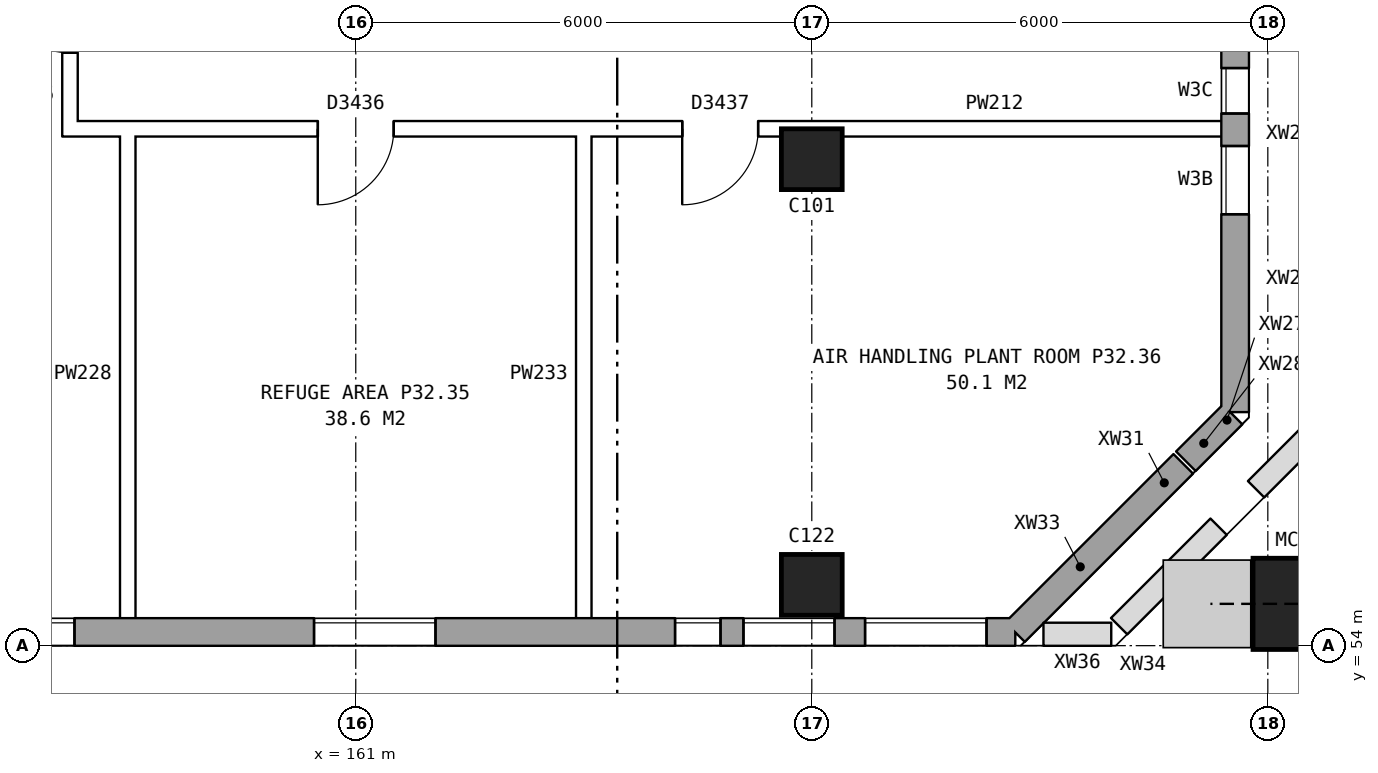
"""IFC4 building model, lengths in metres.
Left out: names, types, materials, properties, quantities, classifications, styles, units other than length and angle.
Written with IfcOpenShell. Run it as: python <this file> out.ifc"""

import sys

from ifc_helpers import new_model, si_unit, direction, frame, frame_2d, origin, origin_2d, place, context, subcontext, project, spatial, rectangle, hollow_rectangle, extrude, element, fill, save


model = new_model("IFC4")
c1 = context("Model", 3, precision=1e-05, world=origin(), true_north=direction((0.0, 1.0)))
c2 = subcontext(c1, "Body", "Model", "MODEL_VIEW")
j1 = project(units=[si_unit("LENGTHUNIT", "METRE"), si_unit("PLANEANGLEUNIT", "RADIAN")], contexts=[c1])
p1 = place(None, origin())
s1 = spatial("IfcSite", under=j1, at=p1, CompositionType="ELEMENT")
p2 = place(p1, origin())
s2 = spatial("IfcBuilding", under=s1, at=p2, CompositionType="ELEMENT")
p3 = place(p2, frame((0.0, 0.0, 115.0)))
s3 = spatial("IfcBuildingStorey", under=s2, at=p3, CompositionType="ELEMENT", Elevation=115.0)
for number, where, z_axis, x_axis in (
    (1, (167.0, 54.8, 0.0), (0.0, 0.0, 1.0), (1.0, 0.0, 0.0)),
    (2, (167.0, 60.4, 0.0), (0.0, 0.0, 1.0), (1.0, 0.0, 0.0)),
):
    element("IfcColumn", number, at=place(p3, frame(where, z_axis=z_axis, x_axis=x_axis)), inside=s3, PredefinedType="COLUMN", context=c2, shape_type="SweptSolid", body=[
        extrude(rectangle(XDim=0.8, YDim=0.8, at=origin_2d()), origin(), (0.0, 0.0, 1.0), 4.2),
    ])
p4 = place(p3, frame((173.406, 54.55, 0.161), z_axis=(-0.267672897269, 0.0, 0.963509844302), x_axis=(0.0, -1.0, 0.0)))
e3 = element("IfcColumn", 3, at=p4, inside=s3, PredefinedType="COLUMN", context=c2, shape_type="SweptSolid", body=[
    extrude(hollow_rectangle(XDim=1.2, YDim=1.2, WallThickness=0.065, at=origin_2d()), origin(), (0.0, 0.0, 1.0), 4.337),
])
p5 = place(p3, frame((134.075, 54.18, 0.0), z_axis=(0.0, 0.0, 1.0), x_axis=(1.0, 0.0, 0.0)))
e4 = element("IfcWall", 4, at=p5, inside=s3, PredefinedType="STANDARD", context=c2, shape_type="SweptSolid", body=[
    extrude(rectangle(XDim=35.601, YDim=0.36, at=frame_2d((17.8, 0.0))), origin(), (0.0, 0.0, 1.0), 4.2),
])
p6 = place(p5, frame((3.125, 0.0, 1.5)))
e5 = element("IfcOpeningElement", 5, at=p6, cuts=e4, PredefinedType="OPENING", context=c2, shape_type="SweptSolid", body=[
    extrude(rectangle(XDim=1.2, YDim=1.2, at=frame_2d((0.6, 0.6))), frame((0.0, 0.19, 0.0), z_axis=(0.0, -1.0, 0.0), x_axis=(1.0, 0.0, 0.0)), (0.0, 0.0, 1.0), 0.38),
])
p7 = place(p5, frame((7.175, 0.0, 1.5)))
e6 = element("IfcOpeningElement", 6, at=p7, cuts=e4, PredefinedType="OPENING", context=c2, shape_type="SweptSolid", body=[
    extrude(rectangle(XDim=1.2, YDim=1.2, at=frame_2d((0.6, 0.6))), frame((0.0, 0.19, 0.0), z_axis=(0.0, -1.0, 0.0), x_axis=(1.0, 0.0, 0.0)), (0.0, 0.0, 1.0), 0.38),
])
p8 = place(p5, frame((9.625, 0.0, 1.5)))
e7 = element("IfcOpeningElement", 7, at=p8, cuts=e4, PredefinedType="OPENING", context=c2, shape_type="SweptSolid", body=[
    extrude(rectangle(XDim=1.6, YDim=1.2, at=frame_2d((0.8, 0.6))), frame((0.0, 0.19, 0.0), z_axis=(0.0, -1.0, 0.0), x_axis=(1.0, 0.0, 0.0)), (0.0, 0.0, 1.0), 0.38),
])
p9 = place(p5, frame((15.125, 0.0, 1.5)))
e8 = element("IfcOpeningElement", 8, at=p9, cuts=e4, PredefinedType="OPENING", context=c2, shape_type="SweptSolid", body=[
    extrude(rectangle(XDim=1.2, YDim=1.2, at=frame_2d((0.6, 0.6))), frame((0.0, 0.19, 0.0), z_axis=(0.0, -1.0, 0.0), x_axis=(1.0, 0.0, 0.0)), (0.0, 0.0, 1.0), 0.38),
])
p10 = place(p5, frame((19.125, 0.0, 1.5)))
e9 = element("IfcOpeningElement", 9, at=p10, cuts=e4, PredefinedType="OPENING", context=c2, shape_type="SweptSolid", body=[
    extrude(rectangle(XDim=0.6, YDim=1.2, at=frame_2d((0.3, 0.6))), frame((0.0, 0.19, 0.0), z_axis=(0.0, -1.0, 0.0), x_axis=(1.0, 0.0, 0.0)), (0.0, 0.0, 1.0), 0.38),
])
p11 = place(p5, frame((21.625, 0.0, 1.5)))
e10 = element("IfcOpeningElement", 10, at=p11, cuts=e4, PredefinedType="OPENING", context=c2, shape_type="SweptSolid", body=[
    extrude(rectangle(XDim=1.6, YDim=1.2, at=frame_2d((0.8, 0.6))), frame((0.0, 0.19, 0.0), z_axis=(0.0, -1.0, 0.0), x_axis=(1.0, 0.0, 0.0)), (0.0, 0.0, 1.0), 0.38),
])
p12 = place(p5, frame((26.375, 0.0, 1.5)))
e11 = element("IfcOpeningElement", 11, at=p12, cuts=e4, PredefinedType="OPENING", context=c2, shape_type="SweptSolid", body=[
    extrude(rectangle(XDim=1.6, YDim=1.2, at=frame_2d((0.8, 0.6))), frame((0.0, 0.19, 0.0), z_axis=(0.0, -1.0, 0.0), x_axis=(1.0, 0.0, 0.0)), (0.0, 0.0, 1.0), 0.38),
])
p13 = place(p5, frame((31.125, 0.0, 1.5)))
e12 = element("IfcOpeningElement", 12, at=p13, cuts=e4, PredefinedType="OPENING", context=c2, shape_type="SweptSolid", body=[
    extrude(rectangle(XDim=0.6, YDim=1.2, at=frame_2d((0.3, 0.6))), frame((0.0, 0.19, 0.0), z_axis=(0.0, -1.0, 0.0), x_axis=(1.0, 0.0, 0.0)), (0.0, 0.0, 1.0), 0.38),
])
p14 = place(p5, frame((33.625, 0.0, 1.5)))
e13 = element("IfcOpeningElement", 13, at=p14, cuts=e4, PredefinedType="OPENING", context=c2, shape_type="SweptSolid", body=[
    extrude(rectangle(XDim=1.6, YDim=1.2, at=frame_2d((0.8, 0.6))), frame((0.0, 0.19, 0.0), z_axis=(0.0, -1.0, 0.0), x_axis=(1.0, 0.0, 0.0)), (0.0, 0.0, 1.0), 0.38),
])
p15 = place(p5, frame((20.025, 0.0, 1.5)))
e14 = element("IfcOpeningElement", 14, at=p15, cuts=e4, PredefinedType="OPENING", context=c2, shape_type="SweptSolid", body=[
    extrude(rectangle(XDim=1.2, YDim=1.2, at=frame_2d((0.6, 0.6))), frame((0.0, 0.19, 0.0), z_axis=(0.0, -1.0, 0.0), x_axis=(1.0, 0.0, 0.0)), (0.0, 0.0, 1.0), 0.38),
])
p16 = place(p5, frame((32.025, 0.0, 1.5)))
e15 = element("IfcOpeningElement", 15, at=p16, cuts=e4, PredefinedType="OPENING", context=c2, shape_type="SweptSolid", body=[
    extrude(rectangle(XDim=1.2, YDim=1.2, at=frame_2d((0.6, 0.6))), frame((0.0, 0.19, 0.0), z_axis=(0.0, -1.0, 0.0), x_axis=(1.0, 0.0, 0.0)), (0.0, 0.0, 1.0), 0.38),
])
p17 = place(p3, frame((169.675, 54.18, 0.0), z_axis=(0.0, 0.0, 1.0), x_axis=(0.707106781187, 0.707106781187, 0.0)))
e16 = element("IfcWall", 16, at=p17, inside=s3, PredefinedType="STANDARD", context=c2, shape_type="SweptSolid", body=[
    extrude(rectangle(XDim=2.424, YDim=0.36, at=frame_2d((1.212, 0.0))), origin(), (0.0, 0.0, 1.0), 4.2),
])
p18 = place(p3, frame((171.389, 55.894, 0.0), z_axis=(0.0, 0.0, 1.0), x_axis=(0.707106781187, 0.707106781187, 0.0)))
e17 = element("IfcWall", 17, at=p18, inside=s3, PredefinedType="STANDARD", context=c2, shape_type="SweptSolid", body=[
    extrude(rectangle(XDim=0.703, YDim=0.36, at=frame_2d((0.351, 0.0))), origin(), (0.0, 0.0, 1.0), 3.397),
])
p19 = place(p3, frame((171.923, 56.428, 0.953), z_axis=(0.0, 0.0, 1.0), x_axis=(0.707291043531, 0.706922470814, 0.0)))
e18 = element("IfcWall", 18, at=p19, inside=s3, PredefinedType="STANDARD", context=c2, shape_type="SweptSolid", body=[
    extrude(rectangle(XDim=0.662, YDim=0.36, at=frame_2d((0.331, 0.0))), origin(), (0.0, 0.0, 1.0), 3.247),
])
p20 = place(p3, frame((172.392, 56.896, 0.0), z_axis=(0.0, 0.0, 1.0), x_axis=(0.706503705369, 0.707709343092, 0.0)))
e19 = element("IfcWall", 19, at=p20, inside=s3, PredefinedType="STANDARD", context=c2, shape_type="SweptSolid", body=[
    extrude(rectangle(XDim=0.202, YDim=0.36, at=frame_2d((0.101, 0.0))), origin(), (0.0, 0.0, 1.0), 4.2),
])
p21 = place(p3, frame((172.57, 57.075, 0.0), z_axis=(0.0, 0.0, 1.0), x_axis=(0.0, 1.0, 0.0)))
e20 = element("IfcWall", 20, at=p21, inside=s3, PredefinedType="STANDARD", context=c2, shape_type="SweptSolid", body=[
    extrude(rectangle(XDim=25.851, YDim=0.36, at=frame_2d((12.925, 0.0))), origin(), (0.0, 0.0, 1.0), 4.2),
])
p22 = place(p21, frame((2.6, 0.0, 1.5)))
e21 = element("IfcOpeningElement", 21, at=p22, cuts=e20, PredefinedType="OPENING", context=c2, shape_type="SweptSolid", body=[
    extrude(rectangle(XDim=0.9, YDim=1.2, at=frame_2d((0.45, 0.6))), frame((0.0, 0.19, 0.0), z_axis=(0.0, -1.0, 0.0), x_axis=(1.0, 0.0, 0.0)), (0.0, 0.0, 1.0), 0.38),
])
p23 = place(p21, frame((3.925, 0.0, 1.5)))
e22 = element("IfcOpeningElement", 22, at=p23, cuts=e20, PredefinedType="OPENING", context=c2, shape_type="SweptSolid", body=[
    extrude(rectangle(XDim=0.6, YDim=1.2, at=frame_2d((0.3, 0.6))), frame((0.0, 0.19, 0.0), z_axis=(0.0, -1.0, 0.0), x_axis=(1.0, 0.0, 0.0)), (0.0, 0.0, 1.0), 0.38),
])
p24 = place(p21, frame((7.625, 0.0, 1.5)))
e23 = element("IfcOpeningElement", 23, at=p24, cuts=e20, PredefinedType="OPENING", context=c2, shape_type="SweptSolid", body=[
    extrude(rectangle(XDim=1.6, YDim=1.2, at=frame_2d((0.8, 0.6))), frame((0.0, 0.19, 0.0), z_axis=(0.0, -1.0, 0.0), x_axis=(1.0, 0.0, 0.0)), (0.0, 0.0, 1.0), 0.38),
])
p25 = place(p21, frame((10.625, 0.0, 1.5)))
e24 = element("IfcOpeningElement", 24, at=p25, cuts=e20, PredefinedType="OPENING", context=c2, shape_type="SweptSolid", body=[
    extrude(rectangle(XDim=1.6, YDim=1.2, at=frame_2d((0.8, 0.6))), frame((0.0, 0.19, 0.0), z_axis=(0.0, -1.0, 0.0), x_axis=(1.0, 0.0, 0.0)), (0.0, 0.0, 1.0), 0.38),
])
p26 = place(p21, frame((9.525, 0.0, 1.5)))
e25 = element("IfcOpeningElement", 25, at=p26, cuts=e20, PredefinedType="OPENING", context=c2, shape_type="SweptSolid", body=[
    extrude(rectangle(XDim=0.6, YDim=1.2, at=frame_2d((0.3, 0.6))), frame((0.0, 0.19, 0.0), z_axis=(0.0, -1.0, 0.0), x_axis=(1.0, 0.0, 0.0)), (0.0, 0.0, 1.0), 0.38),
])
p27 = place(p21, frame((14.975, 0.0, 1.5)))
e26 = element("IfcOpeningElement", 26, at=p27, cuts=e20, PredefinedType="OPENING", context=c2, shape_type="SweptSolid", body=[
    extrude(rectangle(XDim=0.6, YDim=1.2, at=frame_2d((0.3, 0.6))), frame((0.0, 0.19, 0.0), z_axis=(0.0, -1.0, 0.0), x_axis=(1.0, 0.0, 0.0)), (0.0, 0.0, 1.0), 0.38),
])
p28 = place(p21, frame((19.625, 0.0, 1.5)))
e27 = element("IfcOpeningElement", 27, at=p28, cuts=e20, PredefinedType="OPENING", context=c2, shape_type="SweptSolid", body=[
    extrude(rectangle(XDim=1.6, YDim=1.2, at=frame_2d((0.8, 0.6))), frame((0.0, 0.19, 0.0), z_axis=(0.0, -1.0, 0.0), x_axis=(1.0, 0.0, 0.0)), (0.0, 0.0, 1.0), 0.38),
])
p29 = place(p21, frame((22.625, 0.0, 1.5)))
e28 = element("IfcOpeningElement", 28, at=p29, cuts=e20, PredefinedType="OPENING", context=c2, shape_type="SweptSolid", body=[
    extrude(rectangle(XDim=1.6, YDim=1.2, at=frame_2d((0.8, 0.6))), frame((0.0, 0.19, 0.0), z_axis=(0.0, -1.0, 0.0), x_axis=(1.0, 0.0, 0.0)), (0.0, 0.0, 1.0), 0.38),
])
p30 = place(p21, frame((15.875, 0.0, 1.5)))
e29 = element("IfcOpeningElement", 29, at=p30, cuts=e20, PredefinedType="OPENING", context=c2, shape_type="SweptSolid", body=[
    extrude(rectangle(XDim=1.2, YDim=1.2, at=frame_2d((0.6, 0.6))), frame((0.0, 0.19, 0.0), z_axis=(0.0, -1.0, 0.0), x_axis=(1.0, 0.0, 0.0)), (0.0, 0.0, 1.0), 0.38),
])
p31 = place(p3, frame((170.05, 54.15, 0.0), z_axis=(0.0, 0.0, 1.0), x_axis=(1.0, 0.0, 0.0)))
e30 = element("IfcWall", 30, at=p31, inside=s3, PredefinedType="PARAPET", context=c2, shape_type="SweptSolid", body=[
    extrude(rectangle(XDim=0.888, YDim=0.3, at=frame_2d((0.444, 0.0))), origin(), (0.0, 0.0, 1.0), 1.1),
])
p32 = place(p3, frame((171.045, 54.258, 0.0), z_axis=(0.0, 0.0, 1.0), x_axis=(0.707106781187, 0.707106781187, 0.0)))
e31 = element("IfcWall", 31, at=p32, inside=s3, PredefinedType="PARAPET", context=c2, shape_type="SweptSolid", body=[
    extrude(rectangle(XDim=1.847, YDim=0.3, at=frame_2d((0.923, 0.0))), origin(), (0.0, 0.0, 1.0), 1.1),
])
p33 = place(p3, frame((172.847, 56.059, 0.0), z_axis=(0.0, 0.0, 1.0), x_axis=(0.706911150604, 0.70730235766, 0.0)))
e32 = element("IfcWall", 32, at=p33, inside=s3, PredefinedType="PARAPET", context=c2, shape_type="SweptSolid", body=[
    extrude(rectangle(XDim=1.248, YDim=0.3, at=frame_2d((0.624, 0.0))), origin(), (0.0, 0.0, 1.0), 1.1),
])
p34 = place(p3, frame((157.14, 60.8, 0.0), z_axis=(0.0, 0.0, 1.0), x_axis=(1.0, 0.0, 0.0)))
e33 = element("IfcWall", 33, at=p34, inside=s3, PredefinedType="PARTITIONING", context=c2, shape_type="SweptSolid", body=[
    extrude(rectangle(XDim=15.37, YDim=0.2, at=frame_2d((7.685, 0.0))), origin(), (0.0, 0.0, 1.0), 4.2),
])
p35 = place(p34, frame((3.36, 0.0, 0.0)))
e34 = element("IfcOpeningElement", 34, at=p35, cuts=e33, PredefinedType="OPENING", context=c2, shape_type="SweptSolid", body=[
    extrude(rectangle(XDim=1.0, YDim=2.1, at=frame_2d((0.5, 1.05))), frame((0.0, 0.11, 0.0), z_axis=(0.0, -1.0, 0.0), x_axis=(1.0, 0.0, 0.0)), (0.0, 0.0, 1.0), 0.22),
])
p36 = place(p34, frame((8.155, 0.0, 0.0)))
e35 = element("IfcOpeningElement", 35, at=p36, cuts=e33, PredefinedType="OPENING", context=c2, shape_type="SweptSolid", body=[
    extrude(rectangle(XDim=1.0, YDim=2.1, at=frame_2d((0.5, 1.05))), frame((0.0, 0.11, 0.0), z_axis=(0.0, -1.0, 0.0), x_axis=(1.0, 0.0, 0.0)), (0.0, 0.0, 1.0), 0.22),
])
p37 = place(p3, frame((157.24, 60.7, 0.0), z_axis=(0.0, 0.0, 1.0), x_axis=(0.0, 1.0, 0.0)))
e36 = element("IfcWall", 36, at=p37, inside=s3, PredefinedType="PARTITIONING", context=c2, shape_type="SweptSolid", body=[
    extrude(rectangle(XDim=3.2, YDim=0.2, at=frame_2d((1.6, 0.0))), origin(), (0.0, 0.0, 1.0), 4.2),
])
p38 = place(p37, frame((1.1, 0.0, 0.0)))
e37 = element("IfcOpeningElement", 37, at=p38, cuts=e36, PredefinedType="OPENING", context=c2, shape_type="SweptSolid", body=[
    extrude(rectangle(XDim=1.0, YDim=2.1, at=frame_2d((0.5, 1.05))), frame((0.0, 0.11, 0.0), z_axis=(0.0, -1.0, 0.0), x_axis=(1.0, 0.0, 0.0)), (0.0, 0.0, 1.0), 0.22),
])
for number, where, z_axis, x_axis in (
    (38, (158.0, 54.24, 0.0), (0.0, 0.0, 1.0), (0.0, 1.0, 0.0)),
    (39, (164.0, 54.24, 0.0), (0.0, 0.0, 1.0), (0.0, 1.0, 0.0)),
):
    element("IfcWall", number, at=place(p3, frame(where, z_axis=z_axis, x_axis=x_axis)), inside=s3, PredefinedType="PARTITIONING", context=c2, shape_type="SweptSolid", body=[
        extrude(rectangle(XDim=6.66, YDim=0.2, at=frame_2d((3.33, 0.0))), origin(), (0.0, 0.0, 1.0), 4.2),
    ])
p39 = place(p11, origin())
e40 = element("IfcWindow", 40, at=p39, inside=s3, PartitioningType="DOUBLE_PANEL_HORIZONTAL", PredefinedType="WINDOW", context=c2, shape_type="SweptSolid", body=[
    extrude(rectangle(XDim=1.6, YDim=1.2, at=frame_2d((0.8, 0.6))), frame((0.0, 0.15, 0.0), z_axis=(0.0, -1.0, 0.0), x_axis=(1.0, 0.0, 0.0)), (0.0, 0.0, 1.0), 0.06),
])
fill(e10, e40)
p40 = place(p12, origin())
e41 = element("IfcWindow", 41, at=p40, inside=s3, PartitioningType="DOUBLE_PANEL_HORIZONTAL", PredefinedType="WINDOW", context=c2, shape_type="SweptSolid", body=[
    extrude(rectangle(XDim=1.6, YDim=1.2, at=frame_2d((0.8, 0.6))), frame((0.0, 0.15, 0.0), z_axis=(0.0, -1.0, 0.0), x_axis=(1.0, 0.0, 0.0)), (0.0, 0.0, 1.0), 0.06),
])
fill(e11, e41)
p41 = place(p13, origin())
e42 = element("IfcWindow", 42, at=p41, inside=s3, PartitioningType="DOUBLE_PANEL_HORIZONTAL", PredefinedType="WINDOW", context=c2, shape_type="SweptSolid", body=[
    extrude(rectangle(XDim=0.6, YDim=1.2, at=frame_2d((0.3, 0.6))), frame((0.0, 0.15, 0.0), z_axis=(0.0, -1.0, 0.0), x_axis=(1.0, 0.0, 0.0)), (0.0, 0.0, 1.0), 0.06),
])
fill(e12, e42)
p42 = place(p14, origin())
e43 = element("IfcWindow", 43, at=p42, inside=s3, PartitioningType="DOUBLE_PANEL_HORIZONTAL", PredefinedType="WINDOW", context=c2, shape_type="SweptSolid", body=[
    extrude(rectangle(XDim=1.6, YDim=1.2, at=frame_2d((0.8, 0.6))), frame((0.0, 0.15, 0.0), z_axis=(0.0, -1.0, 0.0), x_axis=(1.0, 0.0, 0.0)), (0.0, 0.0, 1.0), 0.06),
])
fill(e13, e43)
p43 = place(p22, origin())
e44 = element("IfcWindow", 44, at=p43, inside=s3, PartitioningType="DOUBLE_PANEL_HORIZONTAL", PredefinedType="WINDOW", context=c2, shape_type="SweptSolid", body=[
    extrude(rectangle(XDim=0.9, YDim=1.2, at=frame_2d((0.45, 0.6))), frame((0.0, 0.15, 0.0), z_axis=(0.0, -1.0, 0.0), x_axis=(1.0, 0.0, 0.0)), (0.0, 0.0, 1.0), 0.06),
])
fill(e21, e44)
p44 = place(p23, origin())
e45 = element("IfcWindow", 45, at=p44, inside=s3, PartitioningType="DOUBLE_PANEL_HORIZONTAL", PredefinedType="WINDOW", context=c2, shape_type="SweptSolid", body=[
    extrude(rectangle(XDim=0.6, YDim=1.2, at=frame_2d((0.3, 0.6))), frame((0.0, 0.15, 0.0), z_axis=(0.0, -1.0, 0.0), x_axis=(1.0, 0.0, 0.0)), (0.0, 0.0, 1.0), 0.06),
])
fill(e22, e45)
p45 = place(p35, frame((1.0, 0.0, 0.0), z_axis=(0.0, 0.0, 1.0), x_axis=(-1.0, 0.0, 0.0)))
e46 = element("IfcDoor", 46, at=p45, inside=s3, OperationType="SINGLE_SWING_RIGHT", PredefinedType="DOOR", context=c2, shape_type="SweptSolid", body=[
    extrude(rectangle(XDim=1.0, YDim=2.1, at=frame_2d((0.5, 1.05))), frame((0.0, 0.025, 0.0), z_axis=(0.0, -1.0, 0.0), x_axis=(1.0, 0.0, 0.0)), (0.0, 0.0, 1.0), 0.05),
])
fill(e34, e46)
p46 = place(p36, frame((1.0, 0.0, 0.0), z_axis=(0.0, 0.0, 1.0), x_axis=(-1.0, 0.0, 0.0)))
e47 = element("IfcDoor", 47, at=p46, inside=s3, OperationType="SINGLE_SWING_RIGHT", PredefinedType="DOOR", context=c2, shape_type="SweptSolid", body=[
    extrude(rectangle(XDim=1.0, YDim=2.1, at=frame_2d((0.5, 1.05))), frame((0.0, 0.025, 0.0), z_axis=(0.0, -1.0, 0.0), x_axis=(1.0, 0.0, 0.0)), (0.0, 0.0, 1.0), 0.05),
])
fill(e35, e47)
p47 = place(p16, origin())
e48 = element("IfcWindow", 48, at=p47, inside=s3, PartitioningType="DOUBLE_PANEL_HORIZONTAL", PredefinedType="WINDOW", context=c2, shape_type="SweptSolid", body=[
    extrude(rectangle(XDim=1.2, YDim=1.2, at=frame_2d((0.6, 0.6))), frame((0.0, 0.15, 0.0), z_axis=(0.0, -1.0, 0.0), x_axis=(1.0, 0.0, 0.0)), (0.0, 0.0, 1.0), 0.06),
])
fill(e15, e48)
save(model, sys.argv[1])
